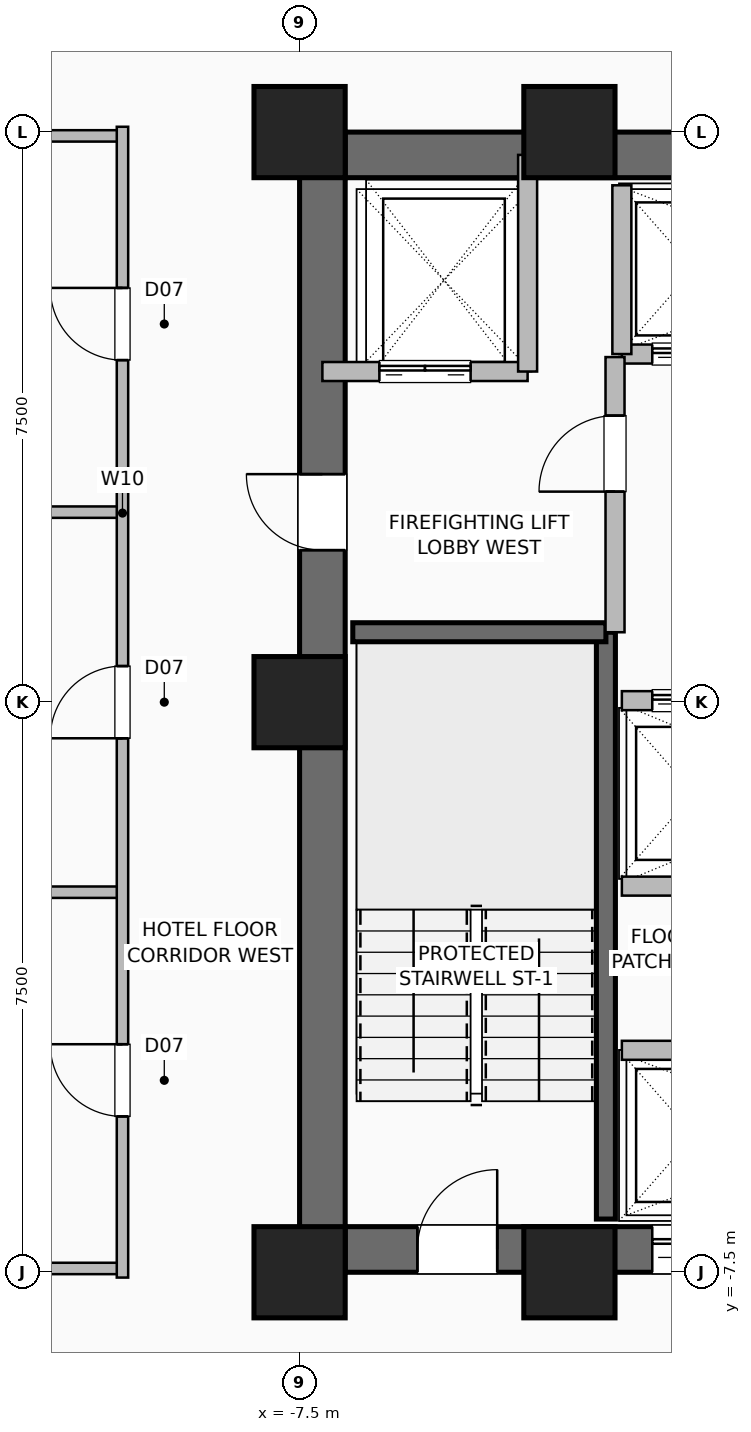
"""IFC4 building model, lengths in metres.
Left out: names, types, materials, properties, quantities, classifications, styles, units other than length and angle.
Written with IfcOpenShell. Run it as: python <this file> out.ifc"""

import sys

from ifc_helpers import new_model, si_unit, direction, frame, frame_2d, origin, origin_2d, place, context, subcontext, project, spatial, rectangle, hollow_rectangle, extrude, element, fill, save


model = new_model("IFC4")
c1 = context("Model", 3, precision=1e-05, world=origin(), true_north=direction((0.0, 1.0)))
c2 = subcontext(c1, "Body", "Model", "MODEL_VIEW")
j1 = project(units=[si_unit("LENGTHUNIT", "METRE"), si_unit("PLANEANGLEUNIT", "RADIAN")], contexts=[c1])
p1 = place(None, origin())
s1 = spatial("IfcSite", under=j1, at=p1, CompositionType="ELEMENT")
p2 = place(p1, origin())
s2 = spatial("IfcBuilding", under=s1, at=p2, CompositionType="ELEMENT")
p3 = place(p2, frame((0.0, 0.0, 76.0)))
s3 = spatial("IfcBuildingStorey", under=s2, at=p3, CompositionType="ELEMENT", Elevation=76.0)
for number, where, z_axis, x_axis in (
    (1, (-7.5, -7.5, 0.0), (0.0, 0.0, 1.0), (1.0, 0.0, 0.0)),
    (2, (-3.95, -7.5, 0.0), (0.0, 0.0, 1.0), (1.0, 0.0, 0.0)),
    (3, (-3.95, 7.5, 0.0), (0.0, 0.0, 1.0), (1.0, 0.0, 0.0)),
    (4, (-7.5, 7.5, 0.0), (0.0, 0.0, 1.0), (1.0, 0.0, 0.0)),
    (5, (-7.5, 0.0, 0.0), (0.0, 0.0, 1.0), (1.0, 0.0, 0.0)),
):
    element("IfcColumn", number, at=place(p3, frame(where, z_axis=z_axis, x_axis=x_axis)), inside=s3, PredefinedType="COLUMN", context=c2, shape_type="SweptSolid", body=[
        extrude(hollow_rectangle(XDim=1.2, YDim=1.2, WallThickness=0.055, at=origin_2d()), origin(), (0.0, 0.0, 1.0), 3.5),
    ])
p4 = place(p3, frame((-7.5, -7.2, 0.0), z_axis=(0.0, 0.0, 1.0), x_axis=(1.0, 0.0, 0.0)))
e6 = element("IfcWall", 6, at=p4, inside=s3, PredefinedType="SHEAR", context=c2, shape_type="SweptSolid", body=[
    extrude(rectangle(XDim=15.0, YDim=0.6, at=frame_2d((7.5, 0.0))), origin(), (0.0, 0.0, 1.0), 3.25),
])
p5 = place(p4, frame((1.55, 0.0, 0.0)))
e7 = element("IfcOpeningElement", 7, at=p5, cuts=e6, PredefinedType="OPENING", context=c2, shape_type="SweptSolid", body=[
    extrude(rectangle(XDim=1.05, YDim=2.08, at=frame_2d((0.525, 1.04))), frame((0.0, 0.31, 0.0), z_axis=(0.0, -1.0, 0.0), x_axis=(1.0, 0.0, 0.0)), (0.0, 0.0, 1.0), 0.62),
])
p6 = place(p4, frame((12.4, 0.0, 0.0)))
e8 = element("IfcOpeningElement", 8, at=p6, cuts=e6, PredefinedType="OPENING", context=c2, shape_type="SweptSolid", body=[
    extrude(rectangle(XDim=1.05, YDim=2.08, at=frame_2d((0.525, 1.04))), frame((0.0, 0.31, 0.0), z_axis=(0.0, -1.0, 0.0), x_axis=(1.0, 0.0, 0.0)), (0.0, 0.0, 1.0), 0.62),
])
p7 = place(p4, frame((4.64, 0.0, 0.0)))
e9 = element("IfcOpeningElement", 9, at=p7, cuts=e6, PredefinedType="OPENING", context=c2, shape_type="SweptSolid", body=[
    extrude(rectangle(XDim=1.1, YDim=2.2, at=frame_2d((0.55, 1.1))), frame((0.0, 0.31, 0.0), z_axis=(0.0, -1.0, 0.0), x_axis=(1.0, 0.0, 0.0)), (0.0, 0.0, 1.0), 0.62),
])
p8 = place(p4, frame((6.52, 0.0, 0.0)))
e10 = element("IfcOpeningElement", 10, at=p8, cuts=e6, PredefinedType="OPENING", context=c2, shape_type="SweptSolid", body=[
    extrude(rectangle(XDim=1.1, YDim=2.2, at=frame_2d((0.55, 1.1))), frame((0.0, 0.31, 0.0), z_axis=(0.0, -1.0, 0.0), x_axis=(1.0, 0.0, 0.0)), (0.0, 0.0, 1.0), 0.62),
])
p9 = place(p4, frame((8.4, 0.0, 0.0)))
e11 = element("IfcOpeningElement", 11, at=p9, cuts=e6, PredefinedType="OPENING", context=c2, shape_type="SweptSolid", body=[
    extrude(rectangle(XDim=1.1, YDim=2.2, at=frame_2d((0.55, 1.1))), frame((0.0, 0.31, 0.0), z_axis=(0.0, -1.0, 0.0), x_axis=(1.0, 0.0, 0.0)), (0.0, 0.0, 1.0), 0.62),
])
p10 = place(p3, frame((-7.5, 7.2, 0.0), z_axis=(0.0, 0.0, 1.0), x_axis=(1.0, 0.0, 0.0)))
e12 = element("IfcWall", 12, at=p10, inside=s3, PredefinedType="SHEAR", context=c2, shape_type="SweptSolid", body=[
    extrude(rectangle(XDim=15.0, YDim=0.6, at=frame_2d((7.5, 0.0))), origin(), (0.0, 0.0, 1.0), 3.25),
])
p11 = place(p3, frame((-7.2, -7.5, 0.0), z_axis=(0.0, 0.0, 1.0), x_axis=(0.0, 1.0, 0.0)))
e13 = element("IfcWall", 13, at=p11, inside=s3, PredefinedType="SHEAR", context=c2, shape_type="SweptSolid", body=[
    extrude(rectangle(XDim=15.0, YDim=0.6, at=frame_2d((7.5, 0.0))), origin(), (0.0, 0.0, 1.0), 3.25),
])
p12 = place(p11, frame((9.5, 0.0, 0.0)))
e14 = element("IfcOpeningElement", 14, at=p12, cuts=e13, PredefinedType="OPENING", context=c2, shape_type="SweptSolid", body=[
    extrude(rectangle(XDim=1.0, YDim=2.08, at=frame_2d((0.5, 1.04))), frame((0.0, 0.31, 0.0), z_axis=(0.0, -1.0, 0.0), x_axis=(1.0, 0.0, 0.0)), (0.0, 0.0, 1.0), 0.62),
])
p13 = place(p3, frame((-3.47, -6.8, 0.0), z_axis=(0.0, 0.0, 1.0), x_axis=(0.0, 1.0, 0.0)))
e15 = element("IfcWall", 15, at=p13, inside=s3, PredefinedType="SHEAR", context=c2, shape_type="SweptSolid", body=[
    extrude(rectangle(XDim=7.72, YDim=0.25, at=frame_2d((3.86, 0.0))), origin(), (0.0, 0.0, 1.0), 3.25),
])
p14 = place(p3, frame((-6.8, 0.92, 0.0), z_axis=(0.0, 0.0, 1.0), x_axis=(1.0, 0.0, 0.0)))
e16 = element("IfcWall", 16, at=p14, inside=s3, PredefinedType="SHEAR", context=c2, shape_type="SweptSolid", body=[
    extrude(rectangle(XDim=3.33, YDim=0.25, at=frame_2d((1.665, 0.0))), origin(), (0.0, 0.0, 1.0), 3.25),
])
p15 = place(p3, frame((-3.26, -4.58, 0.0), z_axis=(0.0, 0.0, 1.0), x_axis=(1.0, 0.0, 0.0)))
e17 = element("IfcWall", 17, at=p15, inside=s3, PredefinedType="SHEAR", context=c2, shape_type="SweptSolid", body=[
    extrude(rectangle(XDim=5.64, YDim=0.25, at=frame_2d((2.82, 0.0))), origin(), (0.0, 0.0, 1.0), 3.25),
])
p16 = place(p3, frame((-3.26, 0.02, 0.0), z_axis=(0.0, 0.0, 1.0), x_axis=(1.0, 0.0, 0.0)))
e18 = element("IfcWall", 18, at=p16, inside=s3, PredefinedType="SHEAR", context=c2, shape_type="SweptSolid", body=[
    extrude(rectangle(XDim=5.64, YDim=0.25, at=frame_2d((2.82, 0.0))), origin(), (0.0, 0.0, 1.0), 3.25),
])
p17 = place(p16, frame((0.4, 0.0, 0.0)))
e19 = element("IfcOpeningElement", 19, at=p17, cuts=e18, PredefinedType="OPENING", context=c2, shape_type="SweptSolid", body=[
    extrude(rectangle(XDim=1.1, YDim=2.2, at=frame_2d((0.55, 1.1))), frame((0.0, 0.135, 0.0), z_axis=(0.0, -1.0, 0.0), x_axis=(1.0, 0.0, 0.0)), (0.0, 0.0, 1.0), 0.27),
])
p18 = place(p16, frame((2.28, 0.0, 0.0)))
e20 = element("IfcOpeningElement", 20, at=p18, cuts=e18, PredefinedType="OPENING", context=c2, shape_type="SweptSolid", body=[
    extrude(rectangle(XDim=1.1, YDim=2.2, at=frame_2d((0.55, 1.1))), frame((0.0, 0.135, 0.0), z_axis=(0.0, -1.0, 0.0), x_axis=(1.0, 0.0, 0.0)), (0.0, 0.0, 1.0), 0.27),
])
p19 = place(p16, frame((4.16, 0.0, 0.0)))
e21 = element("IfcOpeningElement", 21, at=p19, cuts=e18, PredefinedType="OPENING", context=c2, shape_type="SweptSolid", body=[
    extrude(rectangle(XDim=1.1, YDim=2.2, at=frame_2d((0.55, 1.1))), frame((0.0, 0.135, 0.0), z_axis=(0.0, -1.0, 0.0), x_axis=(1.0, 0.0, 0.0)), (0.0, 0.0, 1.0), 0.27),
])
p20 = place(p3, frame((-3.26, -2.42, 0.0), z_axis=(0.0, 0.0, 1.0), x_axis=(1.0, 0.0, 0.0)))
e22 = element("IfcWall", 22, at=p20, inside=s3, PredefinedType="SHEAR", context=c2, shape_type="SweptSolid", body=[
    extrude(rectangle(XDim=5.64, YDim=0.25, at=frame_2d((2.82, 0.0))), origin(), (0.0, 0.0, 1.0), 3.25),
])
p21 = place(p3, frame((-3.26, 4.58, 0.0), z_axis=(0.0, 0.0, 1.0), x_axis=(1.0, 0.0, 0.0)))
e23 = element("IfcWall", 23, at=p21, inside=s3, PredefinedType="SHEAR", context=c2, shape_type="SweptSolid", body=[
    extrude(rectangle(XDim=5.64, YDim=0.25, at=frame_2d((2.82, 0.0))), origin(), (0.0, 0.0, 1.0), 3.25),
])
p22 = place(p21, frame((0.4, 0.0, 0.0)))
e24 = element("IfcOpeningElement", 24, at=p22, cuts=e23, PredefinedType="OPENING", context=c2, shape_type="SweptSolid", body=[
    extrude(rectangle(XDim=1.1, YDim=2.2, at=frame_2d((0.55, 1.1))), frame((0.0, 0.135, 0.0), z_axis=(0.0, -1.0, 0.0), x_axis=(1.0, 0.0, 0.0)), (0.0, 0.0, 1.0), 0.27),
])
p23 = place(p21, frame((2.28, 0.0, 0.0)))
e25 = element("IfcOpeningElement", 25, at=p23, cuts=e23, PredefinedType="OPENING", context=c2, shape_type="SweptSolid", body=[
    extrude(rectangle(XDim=1.1, YDim=2.2, at=frame_2d((0.55, 1.1))), frame((0.0, 0.135, 0.0), z_axis=(0.0, -1.0, 0.0), x_axis=(1.0, 0.0, 0.0)), (0.0, 0.0, 1.0), 0.27),
])
p24 = place(p21, frame((4.16, 0.0, 0.0)))
e26 = element("IfcOpeningElement", 26, at=p24, cuts=e23, PredefinedType="OPENING", context=c2, shape_type="SweptSolid", body=[
    extrude(rectangle(XDim=1.1, YDim=2.2, at=frame_2d((0.55, 1.1))), frame((0.0, 0.135, 0.0), z_axis=(0.0, -1.0, 0.0), x_axis=(1.0, 0.0, 0.0)), (0.0, 0.0, 1.0), 0.27),
])
p25 = place(p3, frame((-3.26, 4.58, 0.0), z_axis=(0.0, 0.0, 1.0), x_axis=(0.0, 1.0, 0.0)))
e27 = element("IfcWall", 27, at=p25, inside=s3, PredefinedType="SHEAR", context=c2, shape_type="SweptSolid", body=[
    extrude(rectangle(XDim=2.22, YDim=0.25, at=frame_2d((1.11, 0.0))), origin(), (0.0, 0.0, 1.0), 3.25),
])
p26 = place(p3, frame((-7.2, 4.35, 0.0), z_axis=(0.0, 0.0, 1.0), x_axis=(1.0, 0.0, 0.0)))
e28 = element("IfcWall", 28, at=p26, inside=s3, PredefinedType="SHEAR", context=c2, shape_type="SweptSolid", body=[
    extrude(rectangle(XDim=2.7, YDim=0.25, at=frame_2d((1.35, 0.0))), origin(), (0.0, 0.0, 1.0), 3.25),
])
p27 = place(p26, frame((0.75, 0.0, 0.0)))
e29 = element("IfcOpeningElement", 29, at=p27, cuts=e28, PredefinedType="OPENING", context=c2, shape_type="SweptSolid", body=[
    extrude(rectangle(XDim=1.2, YDim=2.2, at=frame_2d((0.6, 1.1))), frame((0.0, 0.135, 0.0), z_axis=(0.0, -1.0, 0.0), x_axis=(1.0, 0.0, 0.0)), (0.0, 0.0, 1.0), 0.27),
])
p28 = place(p3, frame((-4.5, 4.35, 0.0), z_axis=(0.0, 0.0, 1.0), x_axis=(0.0, 1.0, 0.0)))
e30 = element("IfcWall", 30, at=p28, inside=s3, PredefinedType="SHEAR", context=c2, shape_type="SweptSolid", body=[
    extrude(rectangle(XDim=2.85, YDim=0.25, at=frame_2d((1.425, 0.0))), origin(), (0.0, 0.0, 1.0), 3.25),
])
p29 = place(p3, frame((-3.35, 0.92, 0.0), z_axis=(0.0, 0.0, 1.0), x_axis=(0.0, 1.0, 0.0)))
e31 = element("IfcWall", 31, at=p29, inside=s3, PredefinedType="SHEAR", context=c2, shape_type="SweptSolid", body=[
    extrude(rectangle(XDim=3.62, YDim=0.25, at=frame_2d((1.81, 0.0))), origin(), (0.0, 0.0, 1.0), 3.25),
])
p30 = place(p29, frame((1.85, 0.0, 0.0)))
e32 = element("IfcOpeningElement", 32, at=p30, cuts=e31, PredefinedType="OPENING", context=c2, shape_type="SweptSolid", body=[
    extrude(rectangle(XDim=1.0, YDim=2.08, at=frame_2d((0.5, 1.04))), frame((0.0, 0.135, 0.0), z_axis=(0.0, -1.0, 0.0), x_axis=(1.0, 0.0, 0.0)), (0.0, 0.0, 1.0), 0.27),
])
for number, where, z_axis, x_axis in (
    (33, (-23.82, -7.45, 0.0), (0.0, 0.0, 1.0), (1.0, 0.0, 0.0)),
    (34, (-23.82, -2.5, 0.0), (0.0, 0.0, 1.0), (1.0, 0.0, 0.0)),
    (35, (-23.82, 2.5, 0.0), (0.0, 0.0, 1.0), (1.0, 0.0, 0.0)),
    (36, (-23.82, 7.45, 0.0), (0.0, 0.0, 1.0), (1.0, 0.0, 0.0)),
):
    element("IfcWall", number, at=place(p3, frame(where, z_axis=z_axis, x_axis=x_axis)), inside=s3, PredefinedType="PARTITIONING", context=c2, shape_type="SweptSolid", body=[
        extrude(rectangle(XDim=13.99, YDim=0.15, at=frame_2d((6.995, 0.0))), origin(), (0.0, 0.0, 1.0), 3.25),
    ])
p31 = place(p3, frame((-9.83, -7.57, 0.0), z_axis=(0.0, 0.0, 1.0), x_axis=(0.0, 1.0, 0.0)))
e37 = element("IfcWall", 37, at=p31, inside=s3, PredefinedType="PARTITIONING", context=c2, shape_type="SweptSolid", body=[
    extrude(rectangle(XDim=15.14, YDim=0.15, at=frame_2d((7.57, 0.0))), origin(), (0.0, 0.0, 1.0), 3.25),
])
p32 = place(p31, frame((2.12, 0.0, 0.0)))
e38 = element("IfcOpeningElement", 38, at=p32, cuts=e37, PredefinedType="OPENING", context=c2, shape_type="SweptSolid", body=[
    extrude(rectangle(XDim=0.95, YDim=2.06, at=frame_2d((0.475, 1.03))), frame((0.0, 0.085, 0.0), z_axis=(0.0, -1.0, 0.0), x_axis=(1.0, 0.0, 0.0)), (0.0, 0.0, 1.0), 0.17),
])
p33 = place(p31, frame((7.095, 0.0, 0.0)))
e39 = element("IfcOpeningElement", 39, at=p33, cuts=e37, PredefinedType="OPENING", context=c2, shape_type="SweptSolid", body=[
    extrude(rectangle(XDim=0.95, YDim=2.06, at=frame_2d((0.475, 1.03))), frame((0.0, 0.085, 0.0), z_axis=(0.0, -1.0, 0.0), x_axis=(1.0, 0.0, 0.0)), (0.0, 0.0, 1.0), 0.17),
])
p34 = place(p31, frame((12.07, 0.0, 0.0)))
e40 = element("IfcOpeningElement", 40, at=p34, cuts=e37, PredefinedType="OPENING", context=c2, shape_type="SweptSolid", body=[
    extrude(rectangle(XDim=0.95, YDim=2.06, at=frame_2d((0.475, 1.03))), frame((0.0, 0.085, 0.0), z_axis=(0.0, -1.0, 0.0), x_axis=(1.0, 0.0, 0.0)), (0.0, 0.0, 1.0), 0.17),
])
p35 = place(p5, origin())
e41 = element("IfcDoor", 41, at=p35, inside=s3, OperationType="SINGLE_SWING_RIGHT", PredefinedType="DOOR", context=c2, shape_type="SweptSolid", body=[
    extrude(rectangle(XDim=1.05, YDim=2.08, at=frame_2d((0.525, 1.04))), frame((0.0, 0.025, 0.0), z_axis=(0.0, -1.0, 0.0), x_axis=(1.0, 0.0, 0.0)), (0.0, 0.0, 1.0), 0.05),
])
fill(e7, e41)
p36 = place(p12, origin())
e42 = element("IfcDoor", 42, at=p36, inside=s3, OperationType="SINGLE_SWING_RIGHT", PredefinedType="DOOR", context=c2, shape_type="SweptSolid", body=[
    extrude(rectangle(XDim=1.0, YDim=2.08, at=frame_2d((0.5, 1.04))), frame((0.0, 0.025, 0.0), z_axis=(0.0, -1.0, 0.0), x_axis=(1.0, 0.0, 0.0)), (0.0, 0.0, 1.0), 0.05),
])
fill(e14, e42)
p37 = place(p7, origin())
e43 = element("IfcDoor", 43, at=p37, inside=s3, OperationType="DOUBLE_DOOR_SLIDING", PredefinedType="DOOR", context=c2, shape_type="SweptSolid", body=[
    extrude(rectangle(XDim=1.1, YDim=2.2, at=frame_2d((0.55, 1.1))), frame((0.0, 0.025, 0.0), z_axis=(0.0, -1.0, 0.0), x_axis=(1.0, 0.0, 0.0)), (0.0, 0.0, 1.0), 0.05),
])
fill(e9, e43)
p38 = place(p17, origin())
e44 = element("IfcDoor", 44, at=p38, inside=s3, OperationType="DOUBLE_DOOR_SLIDING", PredefinedType="DOOR", context=c2, shape_type="SweptSolid", body=[
    extrude(rectangle(XDim=1.1, YDim=2.2, at=frame_2d((0.55, 1.1))), frame((0.0, 0.025, 0.0), z_axis=(0.0, -1.0, 0.0), x_axis=(1.0, 0.0, 0.0)), (0.0, 0.0, 1.0), 0.05),
])
fill(e19, e44)
p39 = place(p22, origin())
e45 = element("IfcDoor", 45, at=p39, inside=s3, OperationType="DOUBLE_DOOR_SLIDING", PredefinedType="DOOR", context=c2, shape_type="SweptSolid", body=[
    extrude(rectangle(XDim=1.1, YDim=2.2, at=frame_2d((0.55, 1.1))), frame((0.0, 0.025, 0.0), z_axis=(0.0, -1.0, 0.0), x_axis=(1.0, 0.0, 0.0)), (0.0, 0.0, 1.0), 0.05),
])
fill(e24, e45)
p40 = place(p27, origin())
e46 = element("IfcDoor", 46, at=p40, inside=s3, OperationType="DOUBLE_DOOR_SLIDING", PredefinedType="DOOR", context=c2, shape_type="SweptSolid", body=[
    extrude(rectangle(XDim=1.2, YDim=2.2, at=frame_2d((0.6, 1.1))), frame((0.0, 0.025, 0.0), z_axis=(0.0, -1.0, 0.0), x_axis=(1.0, 0.0, 0.0)), (0.0, 0.0, 1.0), 0.05),
])
fill(e29, e46)
p41 = place(p30, origin())
e47 = element("IfcDoor", 47, at=p41, inside=s3, OperationType="SINGLE_SWING_LEFT", PredefinedType="DOOR", context=c2, shape_type="SweptSolid", body=[
    extrude(rectangle(XDim=1.0, YDim=2.08, at=frame_2d((0.5, 1.04))), frame((0.0, 0.025, 0.0), z_axis=(0.0, -1.0, 0.0), x_axis=(1.0, 0.0, 0.0)), (0.0, 0.0, 1.0), 0.05),
])
fill(e32, e47)
p42 = place(p32, origin())
e48 = element("IfcDoor", 48, at=p42, inside=s3, OperationType="SINGLE_SWING_RIGHT", PredefinedType="DOOR", context=c2, shape_type="SweptSolid", body=[
    extrude(rectangle(XDim=0.95, YDim=2.06, at=frame_2d((0.475, 1.03))), frame((0.0, 0.025, 0.0), z_axis=(0.0, -1.0, 0.0), x_axis=(1.0, 0.0, 0.0)), (0.0, 0.0, 1.0), 0.05),
])
fill(e38, e48)
p43 = place(p33, origin())
e49 = element("IfcDoor", 49, at=p43, inside=s3, OperationType="SINGLE_SWING_LEFT", PredefinedType="DOOR", context=c2, shape_type="SweptSolid", body=[
    extrude(rectangle(XDim=0.95, YDim=2.06, at=frame_2d((0.475, 1.03))), frame((0.0, 0.025, 0.0), z_axis=(0.0, -1.0, 0.0), x_axis=(1.0, 0.0, 0.0)), (0.0, 0.0, 1.0), 0.05),
])
fill(e39, e49)
p44 = place(p34, origin())
e50 = element("IfcDoor", 50, at=p44, inside=s3, OperationType="SINGLE_SWING_RIGHT", PredefinedType="DOOR", context=c2, shape_type="SweptSolid", body=[
    extrude(rectangle(XDim=0.95, YDim=2.06, at=frame_2d((0.475, 1.03))), frame((0.0, 0.025, 0.0), z_axis=(0.0, -1.0, 0.0), x_axis=(1.0, 0.0, 0.0)), (0.0, 0.0, 1.0), 0.05),
])
fill(e40, e50)
save(model, sys.argv[1])
